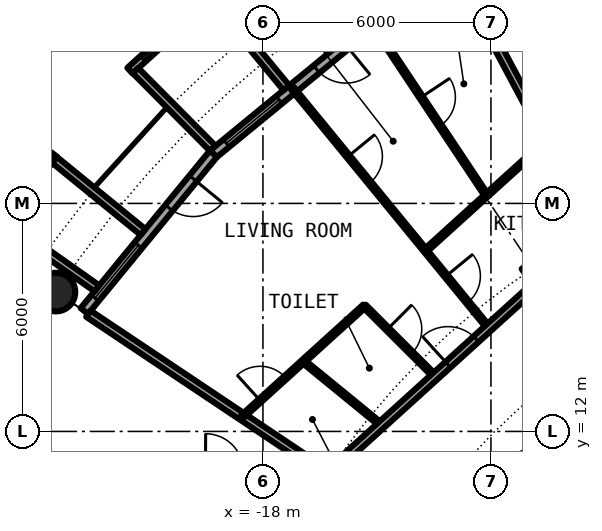
"""IFC4 building model, lengths in metres.
Left out: names, types, materials, properties, quantities, classifications, styles, units other than length and angle.
Written with IfcOpenShell. Run it as: python <this file> out.ifc"""

import sys

from ifc_helpers import new_model, si_unit, direction, frame, frame_2d, origin, origin_2d, place, context, subcontext, project, spatial, rectangle, circle, hollow_circle, i_section, extrude, element, fill, save


model = new_model("IFC4")
c1 = context("Model", 3, precision=1e-05, world=origin(), true_north=direction((0.0, 1.0)))
c2 = subcontext(c1, "Body", "Model", "MODEL_VIEW")
j1 = project(units=[si_unit("LENGTHUNIT", "METRE"), si_unit("PLANEANGLEUNIT", "RADIAN")], contexts=[c1])
p1 = place(None, origin())
s1 = spatial("IfcSite", under=j1, at=p1, CompositionType="ELEMENT")
p2 = place(p1, origin())
s2 = spatial("IfcBuilding", under=s1, at=p2, CompositionType="ELEMENT")
p3 = place(p2, frame((0.0, 0.0, 63.6)))
s3 = spatial("IfcBuildingStorey", under=s2, at=p3, CompositionType="ELEMENT", Elevation=63.6)
p4 = place(p3, frame((-23.448, 15.667, 0.0), z_axis=(0.0, 0.0, 1.0), x_axis=(1.0, 0.0, 0.0)))
e1 = element("IfcColumn", 1, at=p4, inside=s3, PredefinedType="COLUMN", context=c2, shape_type="SweptSolid", body=[
    extrude(hollow_circle(Radius=0.508, WallThickness=0.04, at=origin_2d()), origin(), (0.0, 0.0, 1.0), 3.05),
])
p5 = place(p3, frame((-10.889, 16.297, 0.0), z_axis=(0.0, 0.0, 1.0), x_axis=(-0.55557023302, 0.831469612303, 0.0)))
e2 = element("IfcColumn", 2, at=p5, inside=s3, PredefinedType="COLUMN", context=c2, shape_type="SweptSolid", body=[
    extrude(i_section(OverallWidth=0.306, OverallDepth=0.524, WebThickness=0.021, FlangeThickness=0.04, FilletRadius=0.027, at=origin_2d()), origin(), (0.0, 0.0, 1.0), 3.05),
])
p6 = place(p3, frame((-15.167, 22.699, 0.0), z_axis=(0.0, 0.0, 1.0), x_axis=(-0.773019449054, -0.634382322723, 0.0)))
e3 = element("IfcWall", 3, at=p6, inside=s3, PredefinedType="SOLIDWALL", context=c2, shape_type="SweptSolid", body=[
    extrude(rectangle(XDim=5.352, YDim=0.25, at=frame_2d((2.676, 0.0))), origin(), (0.0, 0.0, 1.0), 2.7),
])
p7 = place(p6, frame((0.841, 0.0, 0.0)))
e4 = element("IfcOpeningElement", 4, at=p7, cuts=e3, PredefinedType="OPENING", context=c2, shape_type="SweptSolid", body=[
    extrude(rectangle(XDim=1.0, YDim=2.2, at=frame_2d((0.5, 1.1))), frame((0.0, 0.135, 0.0), z_axis=(0.0, -1.0, 0.0), x_axis=(1.0, 0.0, 0.0)), (0.0, 0.0, 1.0), 0.27),
])
p8 = place(p6, frame((3.111, 0.0, 0.3)))
e5 = element("IfcOpeningElement", 5, at=p8, cuts=e3, PredefinedType="OPENING", context=c2, shape_type="SweptSolid", body=[
    extrude(rectangle(XDim=1.8, YDim=2.1, at=frame_2d((0.9, 1.05))), frame((0.0, 0.135, 0.0), z_axis=(0.0, -1.0, 0.0), x_axis=(1.0, 0.0, 0.0)), (0.0, 0.0, 1.0), 0.27),
])
p9 = place(p3, frame((-19.282, 23.503, -0.03), z_axis=(0.0, 0.0, 1.0), x_axis=(-0.740998365753, -0.671506829416, 0.0)))
e6 = element("IfcWall", 6, at=p9, inside=s3, PredefinedType="SOLIDWALL", context=c2, shape_type="SweptSolid", body=[
    extrude(rectangle(XDim=2.993, YDim=0.2, at=frame_2d((1.497, 0.0))), origin(), (0.0, 0.0, 1.0), 2.73),
])
p10 = place(p9, frame((0.457, 0.0, 0.33)))
e7 = element("IfcOpeningElement", 7, at=p10, cuts=e6, PredefinedType="OPENING", context=c2, shape_type="SweptSolid", body=[
    extrude(circle(Radius=1.04, at=frame_2d((1.04, 1.04))), frame((0.0, 0.11, 0.0), z_axis=(0.0, -1.0, 0.0), x_axis=(1.0, 0.0, 0.0)), (0.0, 0.0, 1.0), 0.22),
])
p11 = place(p3, frame((-17.384, 21.041, -0.03), z_axis=(0.0, 0.0, 1.0), x_axis=(-0.63709551667, 0.770784861449, 0.0)))
e8 = element("IfcWall", 8, at=p11, inside=s3, PredefinedType="SOLIDWALL", context=c2, shape_type="SweptSolid", body=[
    extrude(rectangle(XDim=3.006, YDim=0.2, at=frame_2d((1.503, 0.0))), origin(), (0.0, 0.0, 1.0), 2.73),
])
p12 = place(p3, frame((-19.323, 19.45, -0.03), z_axis=(0.0, 0.0, 1.0), x_axis=(-0.704476739375, 0.709727076896, 0.0)))
e9 = element("IfcWall", 9, at=p12, inside=s3, PredefinedType="SOLIDWALL", context=c2, shape_type="SweptSolid", body=[
    extrude(rectangle(XDim=2.883, YDim=0.2, at=frame_2d((1.441, 0.0))), origin(), (0.0, 0.0, 1.0), 2.73),
])
p13 = place(p3, frame((-19.304, 19.304, 0.0), z_axis=(0.0, 0.0, 1.0), x_axis=(-0.634382322723, -0.773019449054, 0.0)))
e10 = element("IfcWall", 10, at=p13, inside=s3, PredefinedType="SOLIDWALL", context=c2, shape_type="SweptSolid", body=[
    extrude(rectangle(XDim=5.352, YDim=0.25, at=frame_2d((2.676, 0.0))), origin(), (0.0, 0.0, 1.0), 2.7),
])
p14 = place(p13, frame((0.841, 0.0, 0.0)))
e11 = element("IfcOpeningElement", 11, at=p14, cuts=e10, PredefinedType="OPENING", context=c2, shape_type="SweptSolid", body=[
    extrude(rectangle(XDim=1.0, YDim=2.2, at=frame_2d((0.5, 1.1))), frame((0.0, 0.135, 0.0), z_axis=(0.0, -1.0, 0.0), x_axis=(1.0, 0.0, 0.0)), (0.0, 0.0, 1.0), 0.27),
])
p15 = place(p13, frame((3.111, 0.0, 0.3)))
e12 = element("IfcOpeningElement", 12, at=p15, cuts=e10, PredefinedType="OPENING", context=c2, shape_type="SweptSolid", body=[
    extrude(rectangle(XDim=1.8, YDim=2.1, at=frame_2d((0.9, 1.05))), frame((0.0, 0.135, 0.0), z_axis=(0.0, -1.0, 0.0), x_axis=(1.0, 0.0, 0.0)), (0.0, 0.0, 1.0), 0.27),
])
p16 = place(p3, frame((-23.497, 19.289, -0.03), z_axis=(0.0, 0.0, 1.0), x_axis=(-0.60418752353, -0.796842165306, 0.0)))
e13 = element("IfcWall", 13, at=p16, inside=s3, PredefinedType="SOLIDWALL", context=c2, shape_type="SweptSolid", body=[
    extrude(rectangle(XDim=2.337, YDim=0.2, at=frame_2d((1.168, 0.0))), origin(), (0.0, 0.0, 1.0), 2.73),
])
p17 = place(p16, frame((0.128, 0.0, 0.33)))
e14 = element("IfcOpeningElement", 14, at=p17, cuts=e13, PredefinedType="OPENING", context=c2, shape_type="SweptSolid", body=[
    extrude(circle(Radius=1.04, at=frame_2d((1.04, 1.04))), frame((0.0, 0.11, 0.0), z_axis=(0.0, -1.0, 0.0), x_axis=(1.0, 0.0, 0.0)), (0.0, 0.0, 1.0), 0.22),
])
p18 = place(p3, frame((-21.155, 17.246, -0.03), z_axis=(0.0, 0.0, 1.0), x_axis=(-0.775179004516, 0.631741648902, 0.0)))
e15 = element("IfcWall", 15, at=p18, inside=s3, PredefinedType="SOLIDWALL", context=c2, shape_type="SweptSolid", body=[
    extrude(rectangle(XDim=3.006, YDim=0.2, at=frame_2d((1.503, 0.0))), origin(), (0.0, 0.0, 1.0), 2.73),
])
p19 = place(p3, frame((-22.37, 15.765, -0.03), z_axis=(0.0, 0.0, 1.0), x_axis=(-0.817256123454, 0.576274612209, 0.0)))
e16 = element("IfcWall", 16, at=p19, inside=s3, PredefinedType="SOLIDWALL", context=c2, shape_type="SweptSolid", body=[
    extrude(rectangle(XDim=2.933, YDim=0.2, at=frame_2d((1.466, 0.0))), origin(), (0.0, 0.0, 1.0), 2.73),
])
p20 = place(p3, frame((-22.595, 15.098, 0.0), z_axis=(0.0, 0.0, 1.0), x_axis=(0.831382022135, -0.555701298605, 0.0)))
e17 = element("IfcWall", 17, at=p20, inside=s3, PredefinedType="PARTITIONING", context=c2, shape_type="SweptSolid", body=[
    extrude(rectangle(XDim=7.313, YDim=0.2, at=frame_2d((3.657, 0.0))), origin(), (0.0, 0.0, 1.0), 2.7),
])
p21 = place(p3, frame((-17.219, 21.023, 0.0), z_axis=(0.0, 0.0, 1.0), x_axis=(0.633664062855, -0.773608334654, 0.0)))
e18 = element("IfcWall", 18, at=p21, inside=s3, PredefinedType="PARTITIONING", context=c2, shape_type="SweptSolid", body=[
    extrude(rectangle(XDim=8.138, YDim=0.1, at=frame_2d((4.069, 0.0))), origin(), (0.0, 0.0, 1.0), 2.7),
])
p22 = place(p21, frame((6.377, 0.0, 0.0)))
e19 = element("IfcOpeningElement", 19, at=p22, cuts=e18, PredefinedType="OPENING", context=c2, shape_type="SweptSolid", body=[
    extrude(rectangle(XDim=0.9, YDim=2.3, at=frame_2d((0.45, 1.15))), frame((0.0, 0.06, 0.0), z_axis=(0.0, -1.0, 0.0), x_axis=(1.0, 0.0, 0.0)), (0.0, 0.0, 1.0), 0.12),
])
p23 = place(p21, frame((2.308, 0.0, 0.0)))
e20 = element("IfcOpeningElement", 20, at=p23, cuts=e18, PredefinedType="OPENING", context=c2, shape_type="SweptSolid", body=[
    extrude(rectangle(XDim=0.9, YDim=2.3, at=frame_2d((0.45, 1.15))), frame((0.0, 0.06, 0.0), z_axis=(0.0, -1.0, 0.0), x_axis=(1.0, 0.0, 0.0)), (0.0, 0.0, 1.0), 0.12),
])
p24 = place(p3, frame((-16.936, 13.845, 0.0), z_axis=(0.0, 0.0, 1.0), x_axis=(0.774162545943, -0.632986850147, 0.0)))
e21 = element("IfcWall", 21, at=p24, inside=s3, PredefinedType="PARTITIONING", context=c2, shape_type="SweptSolid", body=[
    extrude(rectangle(XDim=2.649, YDim=0.1, at=frame_2d((1.325, 0.0))), origin(), (0.0, 0.0, 1.0), 2.7),
])
p25 = place(p3, frame((-15.33, 15.3, 0.0), z_axis=(0.0, 0.0, 1.0), x_axis=(0.707851299421, -0.706361478217, 0.0)))
e22 = element("IfcWall", 22, at=p25, inside=s3, PredefinedType="PARTITIONING", context=c2, shape_type="SweptSolid", body=[
    extrude(rectangle(XDim=2.622, YDim=0.1, at=frame_2d((1.311, 0.0))), origin(), (0.0, 0.0, 1.0), 2.7),
])
p26 = place(p25, frame((0.861, 0.0, 0.0)))
e23 = element("IfcOpeningElement", 23, at=p26, cuts=e22, PredefinedType="OPENING", context=c2, shape_type="SweptSolid", body=[
    extrude(rectangle(XDim=0.9, YDim=2.3, at=frame_2d((0.45, 1.15))), frame((0.0, 0.06, 0.0), z_axis=(0.0, -1.0, 0.0), x_axis=(1.0, 0.0, 0.0)), (0.0, 0.0, 1.0), 0.12),
])
p27 = place(p3, frame((-15.054, 22.624, 0.0), z_axis=(0.0, 0.0, 1.0), x_axis=(0.553913391217, -0.832574294, 0.0)))
e24 = element("IfcWall", 24, at=p27, inside=s3, PredefinedType="PARTITIONING", context=c2, shape_type="SweptSolid", body=[
    extrude(rectangle(XDim=5.301, YDim=0.1, at=frame_2d((2.65, 0.0))), origin(), (0.0, 0.0, 1.0), 2.7),
])
p28 = place(p27, frame((2.2, 0.0, 0.0)))
e25 = element("IfcOpeningElement", 25, at=p28, cuts=e24, PredefinedType="OPENING", context=c2, shape_type="SweptSolid", body=[
    extrude(rectangle(XDim=0.9, YDim=2.3, at=frame_2d((0.45, 1.15))), frame((0.0, 0.06, 0.0), z_axis=(0.0, -1.0, 0.0), x_axis=(1.0, 0.0, 0.0)), (0.0, 0.0, 1.0), 0.12),
])
p29 = place(p3, frame((-12.81, 23.966, 0.0), z_axis=(0.0, 0.0, 1.0), x_axis=(0.471439510802, -0.881898399848, 0.0)))
e26 = element("IfcWall", 26, at=p29, inside=s3, PredefinedType="PARTITIONING", context=c2, shape_type="SweptSolid", body=[
    extrude(rectangle(XDim=7.575, YDim=0.2, at=frame_2d((3.787, 0.0))), origin(), (0.0, 0.0, 1.0), 2.7),
])
p30 = place(p3, frame((-12.708, 10.286, 0.0), z_axis=(0.0, 0.0, 1.0), x_axis=(0.831405725802, 0.555665834026, 0.0)))
e27 = element("IfcWall", 27, at=p30, inside=s3, PredefinedType="PARTITIONING", context=c2, shape_type="SweptSolid", body=[
    extrude(rectangle(XDim=11.314, YDim=0.2, at=frame_2d((5.657, 0.0))), origin(), (0.0, 0.0, 1.0), 2.7),
])
p31 = place(p30, frame((5.969, 0.0, 0.0)))
e28 = element("IfcOpeningElement", 28, at=p31, cuts=e27, PredefinedType="OPENING", context=c2, shape_type="SweptSolid", body=[
    extrude(rectangle(XDim=1.0, YDim=2.3, at=frame_2d((0.5, 1.15))), frame((0.0, 0.11, 0.0), z_axis=(0.0, -1.0, 0.0), x_axis=(1.0, 0.0, 0.0)), (0.0, 0.0, 1.0), 0.22),
])
p32 = place(p3, frame((-16.18, 10.995, 0.0), z_axis=(0.0, 0.0, 1.0), x_axis=(0.741086986457, 0.671409024741, 0.0)))
e29 = element("IfcWall", 29, at=p32, inside=s3, PredefinedType="PARTITIONING", context=c2, shape_type="SweptSolid", body=[
    extrude(rectangle(XDim=9.373, YDim=0.2, at=frame_2d((4.687, 0.0))), origin(), (0.0, 0.0, 1.0), 2.38),
])
p33 = place(p32, frame((4.115, 0.0, 0.0)))
e30 = element("IfcOpeningElement", 30, at=p33, cuts=e29, PredefinedType="OPENING", context=c2, shape_type="SweptSolid", body=[
    extrude(rectangle(XDim=1.0, YDim=2.3, at=frame_2d((0.5, 1.15))), frame((0.0, 0.11, 0.0), z_axis=(0.0, -1.0, 0.0), x_axis=(1.0, 0.0, 0.0)), (0.0, 0.0, 1.0), 0.22),
])
p34 = place(p3, frame((-18.54, 12.392, 0.0), z_axis=(0.0, 0.0, 1.0), x_axis=(0.741109646243, 0.671384012504, 0.0)))
e31 = element("IfcWall", 31, at=p34, inside=s3, PredefinedType="PARTITIONING", context=c2, shape_type="SweptSolid", body=[
    extrude(rectangle(XDim=4.331, YDim=0.1, at=frame_2d((2.166, 0.0))), origin(), (0.0, 0.0, 1.0), 2.7),
])
p35 = place(p34, frame((0.629, 0.0, 0.0)))
e32 = element("IfcOpeningElement", 32, at=p35, cuts=e31, PredefinedType="OPENING", context=c2, shape_type="SweptSolid", body=[
    extrude(rectangle(XDim=0.9, YDim=2.3, at=frame_2d((0.45, 1.15))), frame((0.0, 0.06, 0.0), z_axis=(0.0, -1.0, 0.0), x_axis=(1.0, 0.0, 0.0)), (0.0, 0.0, 1.0), 0.12),
])
p36 = place(p3, frame((-13.724, 16.755, 0.0), z_axis=(0.0, 0.0, 1.0), x_axis=(0.741022791884, 0.671479874537, 0.0)))
e33 = element("IfcWall", 33, at=p36, inside=s3, PredefinedType="PARTITIONING", context=c2, shape_type="SweptSolid", body=[
    extrude(rectangle(XDim=4.343, YDim=0.1, at=frame_2d((2.171, 0.0))), origin(), (0.0, 0.0, 1.0), 2.7),
])
p37 = place(p7, origin())
e34 = element("IfcDoor", 34, at=p37, inside=s3, OperationType="SINGLE_SWING_LEFT", PredefinedType="DOOR", context=c2, shape_type="SweptSolid", body=[
    extrude(rectangle(XDim=1.0, YDim=2.2, at=frame_2d((0.5, 1.1))), frame((0.0, 0.025, 0.0), z_axis=(0.0, -1.0, 0.0), x_axis=(1.0, 0.0, 0.0)), (0.0, 0.0, 1.0), 0.05),
])
fill(e4, e34)
p38 = place(p8, origin())
e35 = element("IfcWindow", 35, at=p38, inside=s3, PartitioningType="SINGLE_PANEL", PredefinedType="WINDOW", context=c2, shape_type="SweptSolid", body=[
    extrude(rectangle(XDim=1.8, YDim=2.1, at=frame_2d((0.9, 1.05))), frame((0.0, 0.03, 0.0), z_axis=(0.0, -1.0, 0.0), x_axis=(1.0, 0.0, 0.0)), (0.0, 0.0, 1.0), 0.06),
])
fill(e5, e35)
p39 = place(p10, origin())
e36 = element("IfcWindow", 36, at=p39, inside=s3, PartitioningType="SINGLE_PANEL", PredefinedType="WINDOW", context=c2, shape_type="SweptSolid", body=[
    extrude(circle(Radius=1.04, at=frame_2d((1.04, 1.04))), frame((0.0, 0.03, 0.0), z_axis=(0.0, -1.0, 0.0), x_axis=(1.0, 0.0, 0.0)), (0.0, 0.0, 1.0), 0.06),
])
fill(e7, e36)
p40 = place(p14, origin())
e37 = element("IfcDoor", 37, at=p40, inside=s3, OperationType="SINGLE_SWING_LEFT", PredefinedType="DOOR", context=c2, shape_type="SweptSolid", body=[
    extrude(rectangle(XDim=1.0, YDim=2.2, at=frame_2d((0.5, 1.1))), frame((0.0, 0.025, 0.0), z_axis=(0.0, -1.0, 0.0), x_axis=(1.0, 0.0, 0.0)), (0.0, 0.0, 1.0), 0.05),
])
fill(e11, e37)
p41 = place(p15, origin())
e38 = element("IfcWindow", 38, at=p41, inside=s3, PartitioningType="SINGLE_PANEL", PredefinedType="WINDOW", context=c2, shape_type="SweptSolid", body=[
    extrude(rectangle(XDim=1.8, YDim=2.1, at=frame_2d((0.9, 1.05))), frame((0.0, 0.03, 0.0), z_axis=(0.0, -1.0, 0.0), x_axis=(1.0, 0.0, 0.0)), (0.0, 0.0, 1.0), 0.06),
])
fill(e12, e38)
p42 = place(p33, origin())
e39 = element("IfcDoor", 39, at=p42, inside=s3, OperationType="SINGLE_SWING_LEFT", PredefinedType="DOOR", context=c2, shape_type="SweptSolid", body=[
    extrude(rectangle(XDim=1.0, YDim=2.3, at=frame_2d((0.5, 1.15))), frame((0.0, 0.025, 0.0), z_axis=(0.0, -1.0, 0.0), x_axis=(1.0, 0.0, 0.0)), (0.0, 0.0, 1.0), 0.05),
])
fill(e30, e39)
p43 = place(p35, origin())
e40 = element("IfcDoor", 40, at=p43, inside=s3, OperationType="SINGLE_SWING_LEFT", PredefinedType="DOOR", context=c2, shape_type="SweptSolid", body=[
    extrude(rectangle(XDim=0.9, YDim=2.3, at=frame_2d((0.45, 1.15))), frame((0.0, 0.025, 0.0), z_axis=(0.0, -1.0, 0.0), x_axis=(1.0, 0.0, 0.0)), (0.0, 0.0, 1.0), 0.05),
])
fill(e32, e40)
p44 = place(p26, origin())
e41 = element("IfcDoor", 41, at=p44, inside=s3, OperationType="SINGLE_SWING_RIGHT", PredefinedType="DOOR", context=c2, shape_type="SweptSolid", body=[
    extrude(rectangle(XDim=0.9, YDim=2.3, at=frame_2d((0.45, 1.15))), frame((0.0, 0.025, 0.0), z_axis=(0.0, -1.0, 0.0), x_axis=(1.0, 0.0, 0.0)), (0.0, 0.0, 1.0), 0.05),
])
fill(e23, e41)
p45 = place(p22, origin())
e42 = element("IfcDoor", 42, at=p45, inside=s3, OperationType="SINGLE_SWING_RIGHT", PredefinedType="DOOR", context=c2, shape_type="SweptSolid", body=[
    extrude(rectangle(XDim=0.9, YDim=2.3, at=frame_2d((0.45, 1.15))), frame((0.0, 0.025, 0.0), z_axis=(0.0, -1.0, 0.0), x_axis=(1.0, 0.0, 0.0)), (0.0, 0.0, 1.0), 0.05),
])
fill(e19, e42)
p46 = place(p23, origin())
e43 = element("IfcDoor", 43, at=p46, inside=s3, OperationType="SINGLE_SWING_LEFT", PredefinedType="DOOR", context=c2, shape_type="SweptSolid", body=[
    extrude(rectangle(XDim=0.9, YDim=2.3, at=frame_2d((0.45, 1.15))), frame((0.0, 0.025, 0.0), z_axis=(0.0, -1.0, 0.0), x_axis=(1.0, 0.0, 0.0)), (0.0, 0.0, 1.0), 0.05),
])
fill(e20, e43)
p47 = place(p28, origin())
e44 = element("IfcDoor", 44, at=p47, inside=s3, OperationType="SINGLE_SWING_LEFT", PredefinedType="DOOR", context=c2, shape_type="SweptSolid", body=[
    extrude(rectangle(XDim=0.9, YDim=2.3, at=frame_2d((0.45, 1.15))), frame((0.0, 0.025, 0.0), z_axis=(0.0, -1.0, 0.0), x_axis=(1.0, 0.0, 0.0)), (0.0, 0.0, 1.0), 0.05),
])
fill(e25, e44)
save(model, sys.argv[1])
